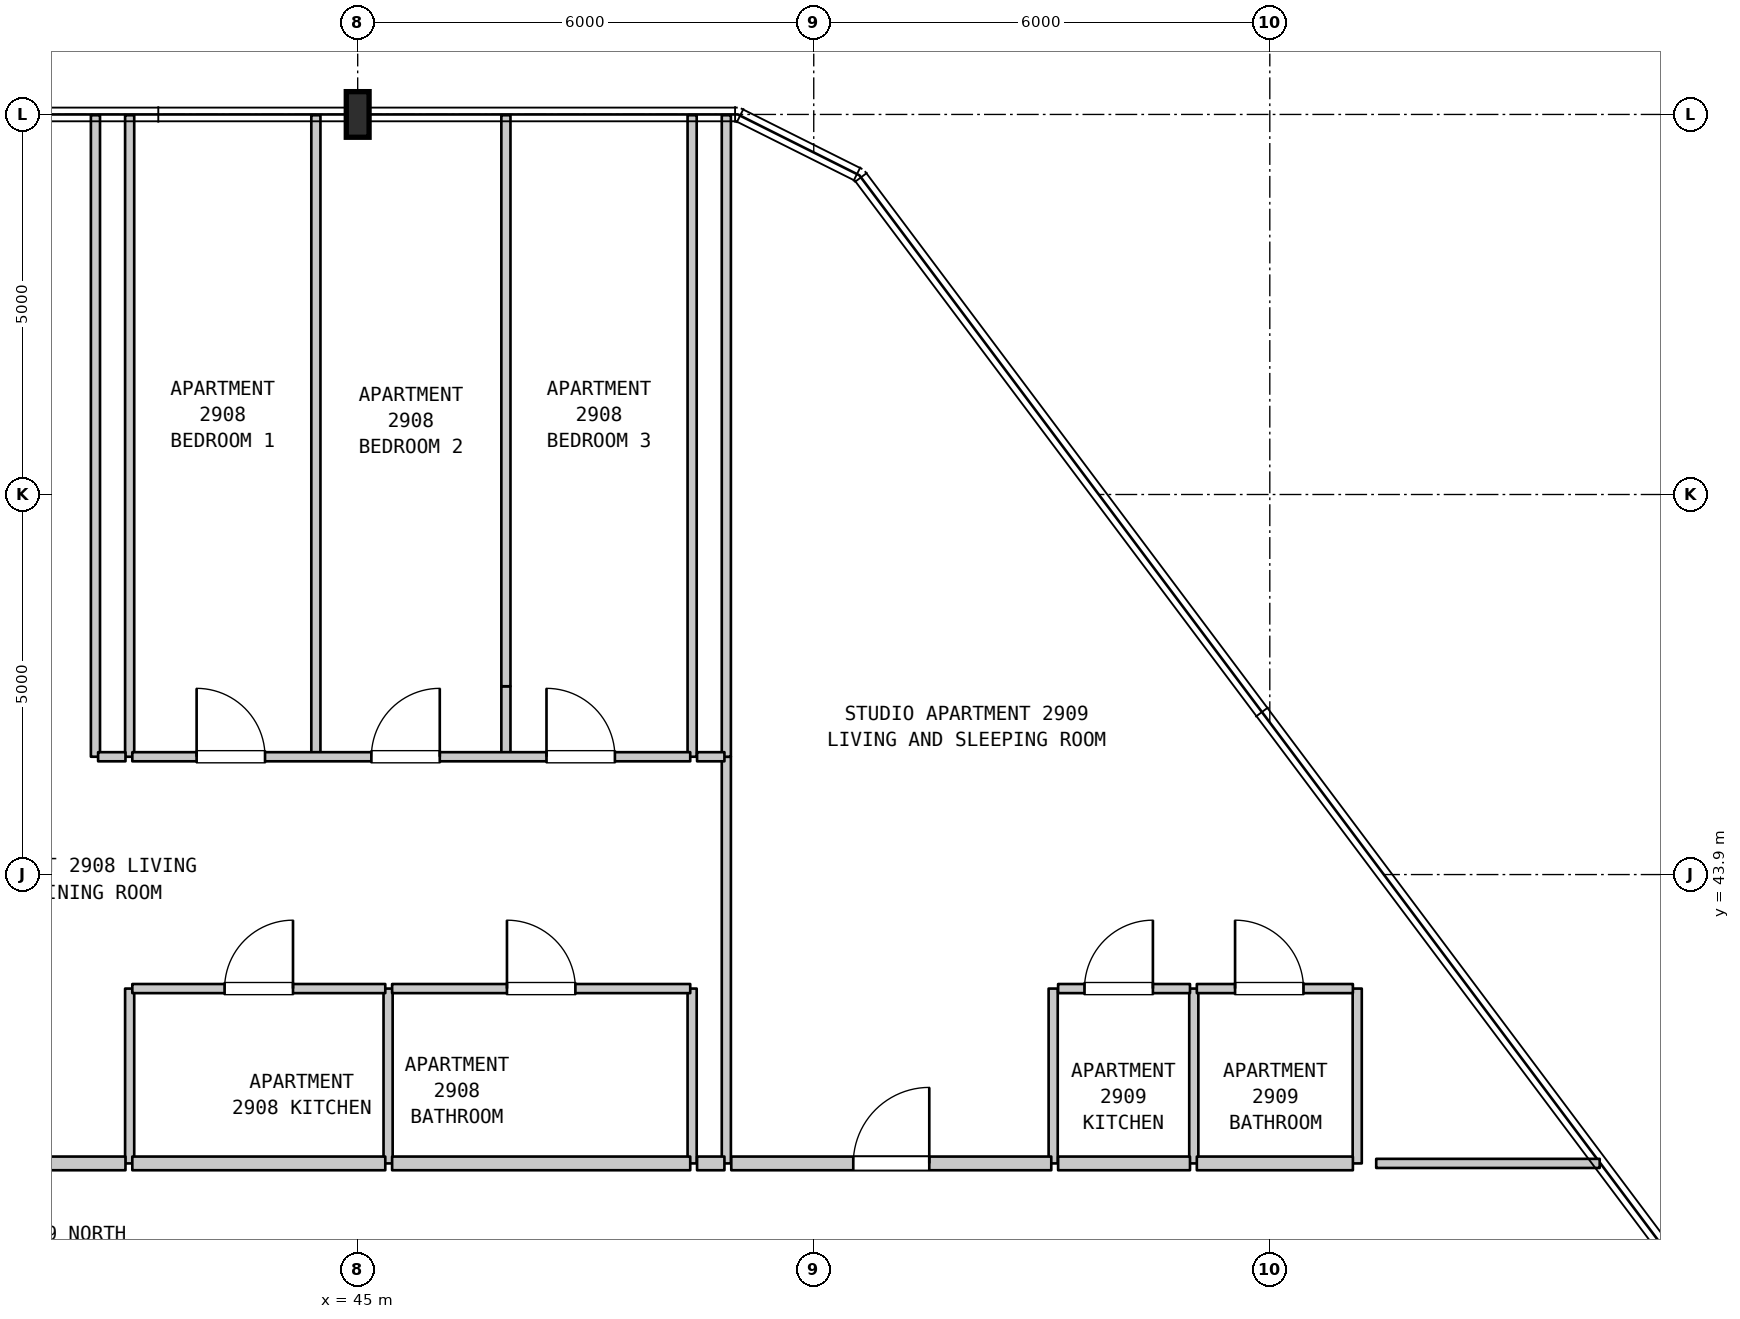
"""IFC4 building model, lengths in metres.
Left out: names, types, materials, properties, quantities, classifications, styles, units other than length and angle.
Written with IfcOpenShell. Run it as: python <this file> out.ifc"""

import sys

from ifc_helpers import new_model, si_unit, direction, frame, frame_2d, origin, origin_2d, place, context, subcontext, project, spatial, rectangle, i_section, extrude, element, fill, save


model = new_model("IFC4")
c1 = context("Model", 3, precision=1e-05, world=origin(), true_north=direction((0.0, 1.0)))
c2 = subcontext(c1, "Body", "Model", "MODEL_VIEW")
j1 = project(units=[si_unit("LENGTHUNIT", "METRE"), si_unit("PLANEANGLEUNIT", "RADIAN")], contexts=[c1])
p1 = place(None, origin())
s1 = spatial("IfcSite", under=j1, at=p1, CompositionType="ELEMENT")
p2 = place(p1, origin())
s2 = spatial("IfcBuilding", under=s1, at=p2, CompositionType="ELEMENT")
p3 = place(p2, frame((0.0, 0.0, 120.5)))
s3 = spatial("IfcBuildingStorey", under=s2, at=p3, CompositionType="ELEMENT", Elevation=120.5)
p4 = place(p3, frame((45.0, 53.9, 0.0), z_axis=(0.0, 0.0, 1.0), x_axis=(1.0, 0.0, 0.0)))
e1 = element("IfcColumn", 1, at=p4, inside=s3, PredefinedType="COLUMN", context=c2, shape_type="SweptSolid", body=[
    extrude(i_section(OverallWidth=0.3, OverallDepth=0.6, WebThickness=0.015, FlangeThickness=0.03, FilletRadius=0.027, at=origin_2d()), origin(), (0.0, 0.0, 1.0), 4.8),
])
p5 = place(p3, frame((41.55, 45.45, 0.0), z_axis=(0.0, 0.0, 1.0), x_axis=(0.0, 1.0, 0.0)))
e2 = element("IfcWall", 2, at=p5, inside=s3, PredefinedType="PARTITIONING", context=c2, shape_type="SweptSolid", body=[
    extrude(rectangle(XDim=8.44, YDim=0.12, at=frame_2d((4.22, 0.0))), origin(), (0.0, 0.0, 1.0), 4.48),
])
p6 = place(p3, frame((42.0, 40.1, 0.0), z_axis=(0.0, 0.0, 1.0), x_axis=(0.0, 1.0, 0.0)))
e3 = element("IfcWall", 3, at=p6, inside=s3, PredefinedType="PARTITIONING", context=c2, shape_type="SweptSolid", body=[
    extrude(rectangle(XDim=2.3, YDim=0.12, at=frame_2d((1.15, 0.0))), origin(), (0.0, 0.0, 1.0), 4.48),
])
for number, where, z_axis, x_axis in (
    (4, (42.0, 45.45, 0.0), (0.0, 0.0, 1.0), (0.0, 1.0, 0.0)),
    (5, (44.45, 45.45, 0.0), (0.0, 0.0, 1.0), (0.0, 1.0, 0.0)),
):
    element("IfcWall", number, at=place(p3, frame(where, z_axis=z_axis, x_axis=x_axis)), inside=s3, PredefinedType="PARTITIONING", context=c2, shape_type="SweptSolid", body=[
        extrude(rectangle(XDim=8.44, YDim=0.12, at=frame_2d((4.22, 0.0))), origin(), (0.0, 0.0, 1.0), 4.48),
    ])
p7 = place(p3, frame((45.4, 40.1, 0.0), z_axis=(0.0, 0.0, 1.0), x_axis=(0.0, 1.0, 0.0)))
e6 = element("IfcWall", 6, at=p7, inside=s3, PredefinedType="PARTITIONING", context=c2, shape_type="SweptSolid", body=[
    extrude(rectangle(XDim=2.3, YDim=0.12, at=frame_2d((1.15, 0.0))), origin(), (0.0, 0.0, 1.0), 4.48),
])
p8 = place(p3, frame((46.95, 45.45, 0.0), z_axis=(0.0, 0.0, 1.0), x_axis=(0.0, 1.0, 0.0)))
e7 = element("IfcWall", 7, at=p8, inside=s3, PredefinedType="PARTITIONING", context=c2, shape_type="SweptSolid", body=[
    extrude(rectangle(XDim=0.927, YDim=0.12, at=frame_2d((0.464, 0.0))), origin(), (0.0, 0.0, 1.0), 3.88),
])
p9 = place(p3, frame((49.4, 40.1, 0.0), z_axis=(0.0, 0.0, 1.0), x_axis=(0.0, 1.0, 0.0)))
e8 = element("IfcWall", 8, at=p9, inside=s3, PredefinedType="PARTITIONING", context=c2, shape_type="SweptSolid", body=[
    extrude(rectangle(XDim=2.3, YDim=0.12, at=frame_2d((1.15, 0.0))), origin(), (0.0, 0.0, 1.0), 4.48),
])
p10 = place(p3, frame((49.4, 45.45, 0.0), z_axis=(0.0, 0.0, 1.0), x_axis=(0.0, 1.0, 0.0)))
e9 = element("IfcWall", 9, at=p10, inside=s3, PredefinedType="PARTITIONING", context=c2, shape_type="SweptSolid", body=[
    extrude(rectangle(XDim=8.44, YDim=0.12, at=frame_2d((4.22, 0.0))), origin(), (0.0, 0.0, 1.0), 4.48),
])
p11 = place(p3, frame((49.85, 40.1, 0.0), z_axis=(0.0, 0.0, 1.0), x_axis=(0.0, 1.0, 0.0)))
e10 = element("IfcWall", 10, at=p11, inside=s3, PredefinedType="PARTITIONING", context=c2, shape_type="SweptSolid", body=[
    extrude(rectangle(XDim=5.35, YDim=0.12, at=frame_2d((2.675, 0.0))), origin(), (0.0, 0.0, 1.0), 4.48),
])
p12 = place(p3, frame((49.85, 45.45, 0.0), z_axis=(0.0, 0.0, 1.0), x_axis=(0.0, 1.0, 0.0)))
e11 = element("IfcWall", 11, at=p12, inside=s3, PredefinedType="PARTITIONING", context=c2, shape_type="SweptSolid", body=[
    extrude(rectangle(XDim=8.44, YDim=0.12, at=frame_2d((4.22, 0.0))), origin(), (0.0, 0.0, 1.0), 4.48),
])
for number, where, z_axis, x_axis in (
    (12, (54.15, 40.1, 0.0), (0.0, 0.0, 1.0), (0.0, 1.0, 0.0)),
    (13, (56.0, 40.1, 0.0), (0.0, 0.0, 1.0), (0.0, 1.0, 0.0)),
    (14, (58.15, 40.1, 0.0), (0.0, 0.0, 1.0), (0.0, 1.0, 0.0)),
):
    element("IfcWall", number, at=place(p3, frame(where, z_axis=z_axis, x_axis=x_axis)), inside=s3, PredefinedType="PARTITIONING", context=c2, shape_type="SweptSolid", body=[
        extrude(rectangle(XDim=2.3, YDim=0.12, at=frame_2d((1.15, 0.0))), origin(), (0.0, 0.0, 1.0), 4.48),
    ])
p13 = place(p3, frame((36.645, 40.1, 0.0), z_axis=(0.0, 0.0, 1.0), x_axis=(1.0, 0.0, 0.0)))
e15 = element("IfcWall", 15, at=p13, inside=s3, PredefinedType="STANDARD", context=c2, shape_type="SweptSolid", body=[
    extrude(rectangle(XDim=5.3, YDim=0.18, at=frame_2d((2.65, 0.0))), origin(), (0.0, 0.0, 1.0), 4.48),
])
p14 = place(p13, frame((2.15, 0.0, 0.0)))
e16 = element("IfcOpeningElement", 16, at=p14, cuts=e15, PredefinedType="OPENING", context=c2, shape_type="SweptSolid", body=[
    extrude(rectangle(XDim=1.0, YDim=2.15, at=frame_2d((0.5, 1.075))), frame((0.0, 0.1, 0.0), z_axis=(0.0, -1.0, 0.0), x_axis=(1.0, 0.0, 0.0)), (0.0, 0.0, 1.0), 0.2),
])
p15 = place(p3, frame((42.035, 40.1, 0.0), z_axis=(0.0, 0.0, 1.0), x_axis=(1.0, 0.0, 0.0)))
e17 = element("IfcWall", 17, at=p15, inside=s3, PredefinedType="STANDARD", context=c2, shape_type="SweptSolid", body=[
    extrude(rectangle(XDim=3.328, YDim=0.18, at=frame_2d((1.664, 0.0))), origin(), (0.0, 0.0, 1.0), 4.48),
])
p16 = place(p3, frame((45.453, 40.1, 0.0), z_axis=(0.0, 0.0, 1.0), x_axis=(1.0, 0.0, 0.0)))
e18 = element("IfcWall", 18, at=p16, inside=s3, PredefinedType="STANDARD", context=c2, shape_type="SweptSolid", body=[
    extrude(rectangle(XDim=3.922, YDim=0.18, at=frame_2d((1.961, 0.0))), origin(), (0.0, 0.0, 1.0), 4.48),
])
p17 = place(p3, frame((49.465, 40.1, 0.0), z_axis=(0.0, 0.0, 1.0), x_axis=(1.0, 0.0, 0.0)))
e19 = element("IfcWall", 19, at=p17, inside=s3, PredefinedType="STANDARD", context=c2, shape_type="SweptSolid", body=[
    extrude(rectangle(XDim=0.36, YDim=0.18, at=frame_2d((0.18, 0.0))), origin(), (0.0, 0.0, 1.0), 4.48),
])
p18 = place(p3, frame((49.915, 40.1, 0.0), z_axis=(0.0, 0.0, 1.0), x_axis=(1.0, 0.0, 0.0)))
e20 = element("IfcWall", 20, at=p18, inside=s3, PredefinedType="STANDARD", context=c2, shape_type="SweptSolid", body=[
    extrude(rectangle(XDim=4.21, YDim=0.18, at=frame_2d((2.105, 0.0))), origin(), (0.0, 0.0, 1.0), 4.48),
])
p19 = place(p18, frame((1.605, 0.0, 0.0)))
e21 = element("IfcOpeningElement", 21, at=p19, cuts=e20, PredefinedType="OPENING", context=c2, shape_type="SweptSolid", body=[
    extrude(rectangle(XDim=1.0, YDim=2.15, at=frame_2d((0.5, 1.075))), frame((0.0, 0.1, 0.0), z_axis=(0.0, -1.0, 0.0), x_axis=(1.0, 0.0, 0.0)), (0.0, 0.0, 1.0), 0.2),
])
p20 = place(p3, frame((54.215, 40.1, 0.0), z_axis=(0.0, 0.0, 1.0), x_axis=(1.0, 0.0, 0.0)))
e22 = element("IfcWall", 22, at=p20, inside=s3, PredefinedType="STANDARD", context=c2, shape_type="SweptSolid", body=[
    extrude(rectangle(XDim=1.735, YDim=0.18, at=frame_2d((0.867, 0.0))), origin(), (0.0, 0.0, 1.0), 4.48),
])
p21 = place(p3, frame((56.04, 40.1, 0.0), z_axis=(0.0, 0.0, 1.0), x_axis=(1.0, 0.0, 0.0)))
e23 = element("IfcWall", 23, at=p21, inside=s3, PredefinedType="STANDARD", context=c2, shape_type="SweptSolid", body=[
    extrude(rectangle(XDim=2.053, YDim=0.18, at=frame_2d((1.026, 0.0))), origin(), (0.0, 0.0, 1.0), 4.48),
])
p22 = place(p3, frame((58.4, 40.1, 0.0), z_axis=(0.0, 0.0, 1.0), x_axis=(1.0, 0.0, 0.0)))
e24 = element("IfcWall", 24, at=p22, inside=s3, PredefinedType="PARTITIONING", context=c2, shape_type="SweptSolid", body=[
    extrude(rectangle(XDim=2.94, YDim=0.12, at=frame_2d((1.47, 0.0))), origin(), (0.0, 0.0, 1.0), 4.48),
])
p23 = place(p3, frame((42.035, 42.4, 0.0), z_axis=(0.0, 0.0, 1.0), x_axis=(1.0, 0.0, 0.0)))
e25 = element("IfcWall", 25, at=p23, inside=s3, PredefinedType="PARTITIONING", context=c2, shape_type="SweptSolid", body=[
    extrude(rectangle(XDim=3.328, YDim=0.12, at=frame_2d((1.664, 0.0))), origin(), (0.0, 0.0, 1.0), 4.48),
])
p24 = place(p23, frame((1.214, 0.0, 0.0)))
e26 = element("IfcOpeningElement", 26, at=p24, cuts=e25, PredefinedType="OPENING", context=c2, shape_type="SweptSolid", body=[
    extrude(rectangle(XDim=0.9, YDim=2.15, at=frame_2d((0.45, 1.075))), frame((0.0, 0.07, 0.0), z_axis=(0.0, -1.0, 0.0), x_axis=(1.0, 0.0, 0.0)), (0.0, 0.0, 1.0), 0.14),
])
p25 = place(p3, frame((45.453, 42.4, 0.0), z_axis=(0.0, 0.0, 1.0), x_axis=(1.0, 0.0, 0.0)))
e27 = element("IfcWall", 27, at=p25, inside=s3, PredefinedType="PARTITIONING", context=c2, shape_type="SweptSolid", body=[
    extrude(rectangle(XDim=3.922, YDim=0.12, at=frame_2d((1.961, 0.0))), origin(), (0.0, 0.0, 1.0), 4.48),
])
p26 = place(p25, frame((1.511, 0.0, 0.0)))
e28 = element("IfcOpeningElement", 28, at=p26, cuts=e27, PredefinedType="OPENING", context=c2, shape_type="SweptSolid", body=[
    extrude(rectangle(XDim=0.9, YDim=2.1, at=frame_2d((0.45, 1.05))), frame((0.0, 0.07, 0.0), z_axis=(0.0, -1.0, 0.0), x_axis=(1.0, 0.0, 0.0)), (0.0, 0.0, 1.0), 0.14),
])
p27 = place(p3, frame((54.215, 42.4, 0.0), z_axis=(0.0, 0.0, 1.0), x_axis=(1.0, 0.0, 0.0)))
e29 = element("IfcWall", 29, at=p27, inside=s3, PredefinedType="PARTITIONING", context=c2, shape_type="SweptSolid", body=[
    extrude(rectangle(XDim=1.735, YDim=0.12, at=frame_2d((0.867, 0.0))), origin(), (0.0, 0.0, 1.0), 4.48),
])
p28 = place(p27, frame((0.347, 0.0, 0.0)))
e30 = element("IfcOpeningElement", 30, at=p28, cuts=e29, PredefinedType="OPENING", context=c2, shape_type="SweptSolid", body=[
    extrude(rectangle(XDim=0.9, YDim=2.15, at=frame_2d((0.45, 1.075))), frame((0.0, 0.07, 0.0), z_axis=(0.0, -1.0, 0.0), x_axis=(1.0, 0.0, 0.0)), (0.0, 0.0, 1.0), 0.14),
])
p29 = place(p3, frame((56.04, 42.4, 0.0), z_axis=(0.0, 0.0, 1.0), x_axis=(1.0, 0.0, 0.0)))
e31 = element("IfcWall", 31, at=p29, inside=s3, PredefinedType="PARTITIONING", context=c2, shape_type="SweptSolid", body=[
    extrude(rectangle(XDim=2.053, YDim=0.12, at=frame_2d((1.026, 0.0))), origin(), (0.0, 0.0, 1.0), 4.48),
])
p30 = place(p29, frame((0.503, 0.0, 0.0)))
e32 = element("IfcOpeningElement", 32, at=p30, cuts=e31, PredefinedType="OPENING", context=c2, shape_type="SweptSolid", body=[
    extrude(rectangle(XDim=0.9, YDim=2.1, at=frame_2d((0.45, 1.05))), frame((0.0, 0.07, 0.0), z_axis=(0.0, -1.0, 0.0), x_axis=(1.0, 0.0, 0.0)), (0.0, 0.0, 1.0), 0.14),
])
p31 = place(p3, frame((41.585, 45.45, 0.0), z_axis=(0.0, 0.0, 1.0), x_axis=(1.0, 0.0, 0.0)))
e33 = element("IfcWall", 33, at=p31, inside=s3, PredefinedType="PARTITIONING", context=c2, shape_type="SweptSolid", body=[
    extrude(rectangle(XDim=0.36, YDim=0.12, at=frame_2d((0.18, 0.0))), origin(), (0.0, 0.0, 1.0), 4.48),
])
p32 = place(p3, frame((42.035, 45.45, 0.0), z_axis=(0.0, 0.0, 1.0), x_axis=(1.0, 0.0, 0.0)))
e34 = element("IfcWall", 34, at=p32, inside=s3, PredefinedType="PARTITIONING", context=c2, shape_type="SweptSolid", body=[
    extrude(rectangle(XDim=7.34, YDim=0.12, at=frame_2d((3.67, 0.0))), origin(), (0.0, 0.0, 1.0), 4.48),
])
p33 = place(p32, frame((0.846, 0.0, 0.0)))
e35 = element("IfcOpeningElement", 35, at=p33, cuts=e34, PredefinedType="OPENING", context=c2, shape_type="SweptSolid", body=[
    extrude(rectangle(XDim=0.9, YDim=2.15, at=frame_2d((0.45, 1.075))), frame((0.0, 0.07, 0.0), z_axis=(0.0, -1.0, 0.0), x_axis=(1.0, 0.0, 0.0)), (0.0, 0.0, 1.0), 0.14),
])
p34 = place(p32, frame((3.145, 0.0, 0.0)))
e36 = element("IfcOpeningElement", 36, at=p34, cuts=e34, PredefinedType="OPENING", context=c2, shape_type="SweptSolid", body=[
    extrude(rectangle(XDim=0.9, YDim=2.15, at=frame_2d((0.45, 1.075))), frame((0.0, 0.07, 0.0), z_axis=(0.0, -1.0, 0.0), x_axis=(1.0, 0.0, 0.0)), (0.0, 0.0, 1.0), 0.14),
])
p35 = place(p32, frame((5.449, 0.0, 0.0)))
e37 = element("IfcOpeningElement", 37, at=p35, cuts=e34, PredefinedType="OPENING", context=c2, shape_type="SweptSolid", body=[
    extrude(rectangle(XDim=0.9, YDim=2.15, at=frame_2d((0.45, 1.075))), frame((0.0, 0.07, 0.0), z_axis=(0.0, -1.0, 0.0), x_axis=(1.0, 0.0, 0.0)), (0.0, 0.0, 1.0), 0.14),
])
p36 = place(p3, frame((49.465, 45.45, 0.0), z_axis=(0.0, 0.0, 1.0), x_axis=(1.0, 0.0, 0.0)))
e38 = element("IfcWall", 38, at=p36, inside=s3, PredefinedType="PARTITIONING", context=c2, shape_type="SweptSolid", body=[
    extrude(rectangle(XDim=0.36, YDim=0.12, at=frame_2d((0.18, 0.0))), origin(), (0.0, 0.0, 1.0), 4.48),
])
p37 = place(p3, frame((46.95, 46.377, 0.0), z_axis=(0.0, 0.0, 1.0), x_axis=(0.0, 1.0, 0.0)))
e39 = element("IfcWall", 39, at=p37, inside=s3, PredefinedType="PARTITIONING", context=c2, shape_type="SweptSolid", body=[
    extrude(rectangle(XDim=7.513, YDim=0.12, at=frame_2d((3.756, 0.0))), origin(), (0.0, 0.0, 1.0), 4.48),
])
p38 = place(p19, origin())
e40 = element("IfcDoor", 40, at=p38, inside=s3, OperationType="SINGLE_SWING_RIGHT", PredefinedType="DOOR", context=c2, shape_type="SweptSolid", body=[
    extrude(rectangle(XDim=1.0, YDim=2.15, at=frame_2d((0.5, 1.075))), frame((0.0, 0.025, 0.0), z_axis=(0.0, -1.0, 0.0), x_axis=(1.0, 0.0, 0.0)), (0.0, 0.0, 1.0), 0.05),
])
fill(e21, e40)
p39 = place(p24, origin())
e41 = element("IfcDoor", 41, at=p39, inside=s3, OperationType="SINGLE_SWING_RIGHT", PredefinedType="DOOR", context=c2, shape_type="SweptSolid", body=[
    extrude(rectangle(XDim=0.9, YDim=2.15, at=frame_2d((0.45, 1.075))), frame((0.0, 0.025, 0.0), z_axis=(0.0, -1.0, 0.0), x_axis=(1.0, 0.0, 0.0)), (0.0, 0.0, 1.0), 0.05),
])
fill(e26, e41)
p40 = place(p26, origin())
e42 = element("IfcDoor", 42, at=p40, inside=s3, OperationType="SINGLE_SWING_LEFT", PredefinedType="DOOR", context=c2, shape_type="SweptSolid", body=[
    extrude(rectangle(XDim=0.9, YDim=2.1, at=frame_2d((0.45, 1.05))), frame((0.0, 0.025, 0.0), z_axis=(0.0, -1.0, 0.0), x_axis=(1.0, 0.0, 0.0)), (0.0, 0.0, 1.0), 0.05),
])
fill(e28, e42)
p41 = place(p28, origin())
e43 = element("IfcDoor", 43, at=p41, inside=s3, OperationType="SINGLE_SWING_RIGHT", PredefinedType="DOOR", context=c2, shape_type="SweptSolid", body=[
    extrude(rectangle(XDim=0.9, YDim=2.15, at=frame_2d((0.45, 1.075))), frame((0.0, 0.025, 0.0), z_axis=(0.0, -1.0, 0.0), x_axis=(1.0, 0.0, 0.0)), (0.0, 0.0, 1.0), 0.05),
])
fill(e30, e43)
p42 = place(p30, origin())
e44 = element("IfcDoor", 44, at=p42, inside=s3, OperationType="SINGLE_SWING_LEFT", PredefinedType="DOOR", context=c2, shape_type="SweptSolid", body=[
    extrude(rectangle(XDim=0.9, YDim=2.1, at=frame_2d((0.45, 1.05))), frame((0.0, 0.025, 0.0), z_axis=(0.0, -1.0, 0.0), x_axis=(1.0, 0.0, 0.0)), (0.0, 0.0, 1.0), 0.05),
])
fill(e32, e44)
p43 = place(p33, origin())
e45 = element("IfcDoor", 45, at=p43, inside=s3, OperationType="SINGLE_SWING_LEFT", PredefinedType="DOOR", context=c2, shape_type="SweptSolid", body=[
    extrude(rectangle(XDim=0.9, YDim=2.15, at=frame_2d((0.45, 1.075))), frame((0.0, 0.025, 0.0), z_axis=(0.0, -1.0, 0.0), x_axis=(1.0, 0.0, 0.0)), (0.0, 0.0, 1.0), 0.05),
])
fill(e35, e45)
p44 = place(p34, origin())
e46 = element("IfcDoor", 46, at=p44, inside=s3, OperationType="SINGLE_SWING_RIGHT", PredefinedType="DOOR", context=c2, shape_type="SweptSolid", body=[
    extrude(rectangle(XDim=0.9, YDim=2.15, at=frame_2d((0.45, 1.075))), frame((0.0, 0.025, 0.0), z_axis=(0.0, -1.0, 0.0), x_axis=(1.0, 0.0, 0.0)), (0.0, 0.0, 1.0), 0.05),
])
fill(e36, e46)
p45 = place(p35, origin())
e47 = element("IfcDoor", 47, at=p45, inside=s3, OperationType="SINGLE_SWING_LEFT", PredefinedType="DOOR", context=c2, shape_type="SweptSolid", body=[
    extrude(rectangle(XDim=0.9, YDim=2.15, at=frame_2d((0.45, 1.075))), frame((0.0, 0.025, 0.0), z_axis=(0.0, -1.0, 0.0), x_axis=(1.0, 0.0, 0.0)), (0.0, 0.0, 1.0), 0.05),
])
fill(e37, e47)
save(model, sys.argv[1])
